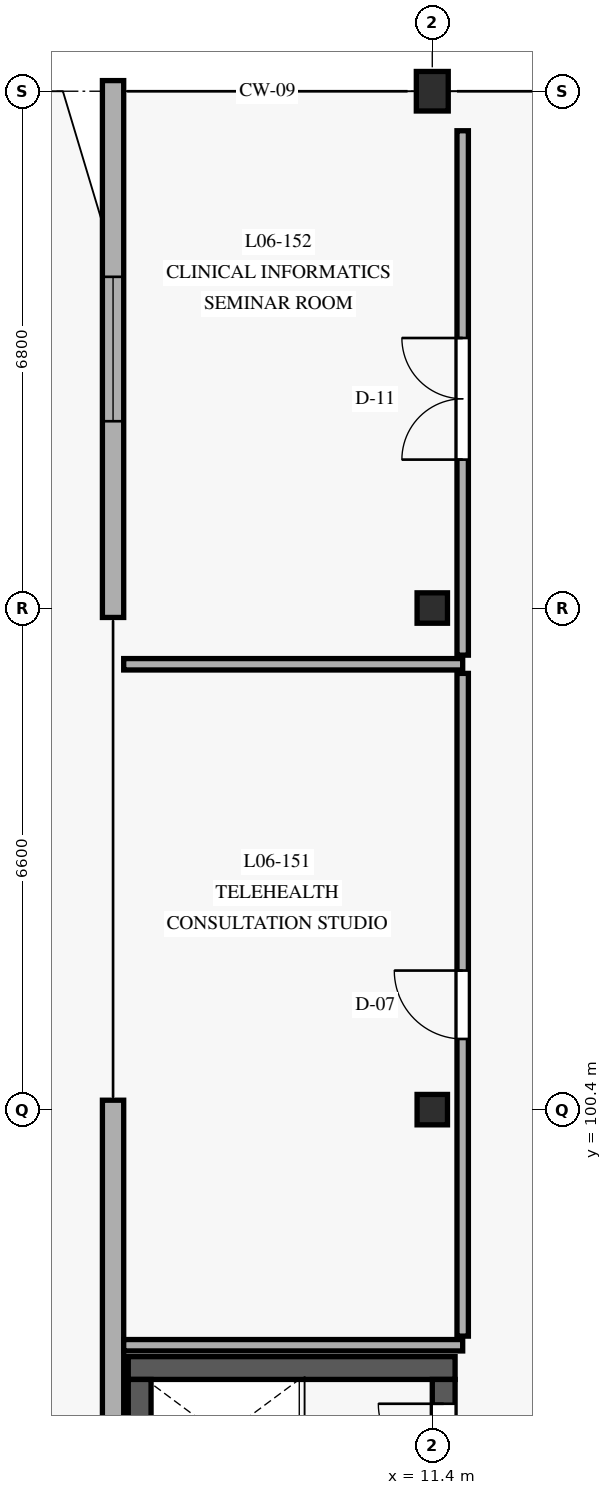
"""IFC4 building model, lengths in metres.
Left out: names, types, materials, properties, quantities, classifications, styles, units other than length and angle.
Written with IfcOpenShell. Run it as: python <this file> out.ifc"""

import sys

from ifc_helpers import new_model, si_unit, direction, frame, frame_2d, origin, origin_with_axes, origin_2d, place, context, subcontext, project, spatial, rectangle, extrude, element, fill, save


model = new_model("IFC4")
c1 = context("Model", 3, precision=1e-05, world=origin(), true_north=direction((0.0, 1.0)))
c2 = subcontext(c1, "Body", "Model", "MODEL_VIEW")
j1 = project(units=[si_unit("LENGTHUNIT", "METRE"), si_unit("PLANEANGLEUNIT", "RADIAN")], contexts=[c1])
p1 = place(None, origin())
s1 = spatial("IfcSite", under=j1, at=p1, CompositionType="ELEMENT")
p2 = place(p1, origin())
s2 = spatial("IfcBuilding", under=s1, at=p2, CompositionType="ELEMENT")
p3 = place(p2, frame((0.0, 0.0, 21.6)))
s3 = spatial("IfcBuildingStorey", under=s2, at=p3, CompositionType="ELEMENT", Elevation=21.6)
for number, where, z_axis, x_axis in (
    (1, (11.4, 100.4, 0.0), (0.0, 0.0, 1.0), (1.0, 0.0, 0.0)),
    (2, (11.4, 107.0, 0.0), (0.0, 0.0, 1.0), (1.0, 0.0, 0.0)),
):
    element("IfcColumn", number, at=place(p3, frame(where, z_axis=z_axis, x_axis=x_axis)), inside=s3, PredefinedType="COLUMN", context=c2, shape_type="SweptSolid", body=[
        extrude(rectangle(XDim=0.4, YDim=0.4, at=origin_2d()), origin(), (0.0, 0.0, 1.0), 4.05),
    ])
p4 = place(p3, frame((11.4, 113.8, 0.0), z_axis=(0.0, 0.0, 1.0), x_axis=(1.0, 0.0, 0.0)))
e3 = element("IfcColumn", 3, at=p4, inside=s3, PredefinedType="COLUMN", context=c2, shape_type="SweptSolid", body=[
    extrude(rectangle(XDim=0.42, YDim=0.52, at=origin_2d()), origin(), (0.0, 0.0, 1.0), 4.05),
])
p5 = place(p3, frame((11.7, 97.0, 0.0), z_axis=(0.0, 0.0, 1.0), x_axis=(-1.0, 0.0, 0.0)))
e4 = element("IfcWall", 4, at=p5, inside=s3, PredefinedType="SHEAR", context=c2, shape_type="SweptSolid", body=[
    extrude(rectangle(XDim=4.3, YDim=0.3, at=frame_2d((2.15, 0.0))), origin(), (0.0, 0.0, 1.0), 3.84),
])
p6 = place(p3, frame((7.55, 96.85, 0.0), z_axis=(0.0, 0.0, 1.0), x_axis=(0.0, -1.0, 0.0)))
e5 = element("IfcWall", 5, at=p6, inside=s3, PredefinedType="SHEAR", context=c2, shape_type="SweptSolid", body=[
    extrude(rectangle(XDim=8.7, YDim=0.3, at=frame_2d((4.35, 0.0))), origin(), (0.0, 0.0, 1.0), 3.84),
])
p7 = place(p3, frame((11.55, 88.15, 0.0), z_axis=(0.0, 0.0, 1.0), x_axis=(0.0, 1.0, 0.0)))
e6 = element("IfcWall", 6, at=p7, inside=s3, PredefinedType="SHEAR", context=c2, shape_type="SweptSolid", body=[
    extrude(rectangle(XDim=8.7, YDim=0.3, at=frame_2d((4.35, 0.0))), origin(), (0.0, 0.0, 1.0), 3.84),
])
p8 = place(p7, frame((0.2, 0.0, 0.0)))
e7 = element("IfcOpeningElement", 7, at=p8, cuts=e6, PredefinedType="OPENING", context=c2, shape_type="SweptSolid", body=[
    extrude(rectangle(XDim=1.1, YDim=2.2, at=frame_2d((0.55, 1.1))), frame((0.0, 0.16, 0.0), z_axis=(0.0, -1.0, 0.0), x_axis=(1.0, 0.0, 0.0)), (0.0, 0.0, 1.0), 0.32),
])
p9 = place(p7, frame((7.52, 0.0, 0.0)))
e8 = element("IfcOpeningElement", 8, at=p9, cuts=e6, PredefinedType="OPENING", context=c2, shape_type="SweptSolid", body=[
    extrude(rectangle(XDim=0.86, YDim=2.05, at=frame_2d((0.43, 1.025))), frame((0.0, 0.16, 0.0), z_axis=(0.0, -1.0, 0.0), x_axis=(1.0, 0.0, 0.0)), (0.0, 0.0, 1.0), 0.32),
])
p10 = place(p3, frame((7.2, 100.524, 0.0), z_axis=(0.0, 0.0, 1.0), x_axis=(0.0, -1.0, 0.0)))
e9 = element("IfcWall", 9, at=p10, inside=s3, PredefinedType="SOLIDWALL", context=c2, shape_type="SweptSolid", body=[
    extrude(rectangle(XDim=6.848, YDim=0.28, at=frame_2d((3.424, 0.0))), origin(), (0.0, 0.0, 1.0), 3.84),
])
p11 = place(p10, frame((4.261, 0.0, 0.85)))
e10 = element("IfcOpeningElement", 10, at=p11, cuts=e9, PredefinedType="OPENING", context=c2, shape_type="SweptSolid", body=[
    extrude(rectangle(XDim=1.9, YDim=1.75, at=frame_2d((0.95, 0.875))), frame((0.0, 0.15, 0.0), z_axis=(0.0, -1.0, 0.0), x_axis=(1.0, 0.0, 0.0)), (0.0, 0.0, 1.0), 0.3),
])
p12 = place(p3, frame((7.2, 113.94, 0.0), z_axis=(0.0, 0.0, 1.0), x_axis=(0.0, -1.0, 0.0)))
e11 = element("IfcWall", 11, at=p12, inside=s3, PredefinedType="SOLIDWALL", context=c2, shape_type="SweptSolid", body=[
    extrude(rectangle(XDim=7.064, YDim=0.28, at=frame_2d((3.532, 0.0))), origin(), (0.0, 0.0, 1.0), 3.84),
])
p13 = place(p12, frame((2.582, 0.0, 0.85)))
e12 = element("IfcOpeningElement", 12, at=p13, cuts=e11, PredefinedType="OPENING", context=c2, shape_type="SweptSolid", body=[
    extrude(rectangle(XDim=1.9, YDim=1.75, at=frame_2d((0.95, 0.875))), frame((0.0, 0.15, 0.0), z_axis=(0.0, -1.0, 0.0), x_axis=(1.0, 0.0, 0.0)), (0.0, 0.0, 1.0), 0.3),
])
p14 = place(p3, frame((11.8, 97.42, 0.0), z_axis=(0.0, 0.0, 1.0), x_axis=(0.0, 1.0, 0.0)))
e13 = element("IfcWall", 13, at=p14, inside=s3, PredefinedType="PARTITIONING", context=c2, shape_type="SweptSolid", body=[
    extrude(rectangle(XDim=8.72, YDim=0.15, at=frame_2d((4.36, 0.0))), origin(), (0.0, 0.0, 1.0), 3.435),
])
p15 = place(p14, frame((3.91, 0.0, 0.0)))
e14 = element("IfcOpeningElement", 14, at=p15, cuts=e13, PredefinedType="OPENING", context=c2, shape_type="SweptSolid", body=[
    extrude(rectangle(XDim=0.9, YDim=2.12, at=frame_2d((0.45, 1.06))), frame((0.0, 0.085, 0.0), z_axis=(0.0, -1.0, 0.0), x_axis=(1.0, 0.0, 0.0)), (0.0, 0.0, 1.0), 0.17),
])
p16 = place(p3, frame((7.34, 106.26, 0.0), z_axis=(0.0, 0.0, 1.0), x_axis=(1.0, 0.0, 0.0)))
e15 = element("IfcWall", 15, at=p16, inside=s3, PredefinedType="PARTITIONING", context=c2, shape_type="SweptSolid", body=[
    extrude(rectangle(XDim=4.46, YDim=0.15, at=frame_2d((2.23, 0.0))), origin(), (0.0, 0.0, 1.0), 3.455),
])
p17 = place(p3, frame((7.34, 97.3, 0.0), z_axis=(0.0, 0.0, 1.0), x_axis=(1.0, 0.0, 0.0)))
e16 = element("IfcWall", 16, at=p17, inside=s3, PredefinedType="PARTITIONING", context=c2, shape_type="SweptSolid", body=[
    extrude(rectangle(XDim=4.46, YDim=0.15, at=frame_2d((2.23, 0.0))), origin(), (0.0, 0.0, 1.0), 3.835),
])
p18 = place(p3, frame((11.8, 106.38, 0.0), z_axis=(0.0, 0.0, 1.0), x_axis=(0.0, 1.0, 0.0)))
e17 = element("IfcWall", 17, at=p18, inside=s3, PredefinedType="PARTITIONING", context=c2, shape_type="SweptSolid", body=[
    extrude(rectangle(XDim=6.9, YDim=0.15, at=frame_2d((3.45, 0.0))), origin(), (0.0, 0.0, 1.0), 3.435),
])
p19 = place(p18, frame((2.573, 0.0, 0.0)))
e18 = element("IfcOpeningElement", 18, at=p19, cuts=e17, PredefinedType="OPENING", context=c2, shape_type="SweptSolid", body=[
    extrude(rectangle(XDim=1.6, YDim=2.25, at=frame_2d((0.8, 1.125))), frame((0.0, 0.085, 0.0), z_axis=(0.0, -1.0, 0.0), x_axis=(1.0, 0.0, 0.0)), (0.0, 0.0, 1.0), 0.17),
])
p20 = place(p9, origin_with_axes())
e19 = element("IfcDoor", 19, at=p20, inside=s3, OperationType="SINGLE_SWING_RIGHT", PredefinedType="DOOR", context=c2, shape_type="SweptSolid", body=[
    extrude(rectangle(XDim=0.86, YDim=2.05, at=frame_2d((0.43, 1.025))), frame((0.0, 0.025, 0.0), z_axis=(0.0, -1.0, 0.0), x_axis=(1.0, 0.0, 0.0)), (0.0, 0.0, 1.0), 0.05),
])
fill(e8, e19)
p21 = place(p13, origin_with_axes())
e20 = element("IfcWindow", 20, at=p21, inside=s3, PartitioningType="SINGLE_PANEL", PredefinedType="WINDOW", context=c2, shape_type="SweptSolid", body=[
    extrude(rectangle(XDim=1.9, YDim=1.75, at=frame_2d((0.95, 0.875))), frame((0.0, 0.03, 0.0), z_axis=(0.0, -1.0, 0.0), x_axis=(1.0, 0.0, 0.0)), (0.0, 0.0, 1.0), 0.06),
])
fill(e12, e20)
p22 = place(p15, origin_with_axes())
e21 = element("IfcDoor", 21, at=p22, inside=s3, OperationType="SINGLE_SWING_RIGHT", PredefinedType="DOOR", context=c2, shape_type="SweptSolid", body=[
    extrude(rectangle(XDim=0.9, YDim=2.12, at=frame_2d((0.45, 1.06))), frame((0.0, 0.025, 0.0), z_axis=(0.0, -1.0, 0.0), x_axis=(1.0, 0.0, 0.0)), (0.0, 0.0, 1.0), 0.05),
])
fill(e14, e21)
p23 = place(p19, origin_with_axes())
e22 = element("IfcDoor", 22, at=p23, inside=s3, OperationType="DOUBLE_DOOR_SINGLE_SWING", PredefinedType="DOOR", context=c2, shape_type="SweptSolid", body=[
    extrude(rectangle(XDim=1.6, YDim=2.25, at=frame_2d((0.8, 1.125))), frame((0.0, 0.025, 0.0), z_axis=(0.0, -1.0, 0.0), x_axis=(1.0, 0.0, 0.0)), (0.0, 0.0, 1.0), 0.05),
])
fill(e18, e22)
save(model, sys.argv[1])
